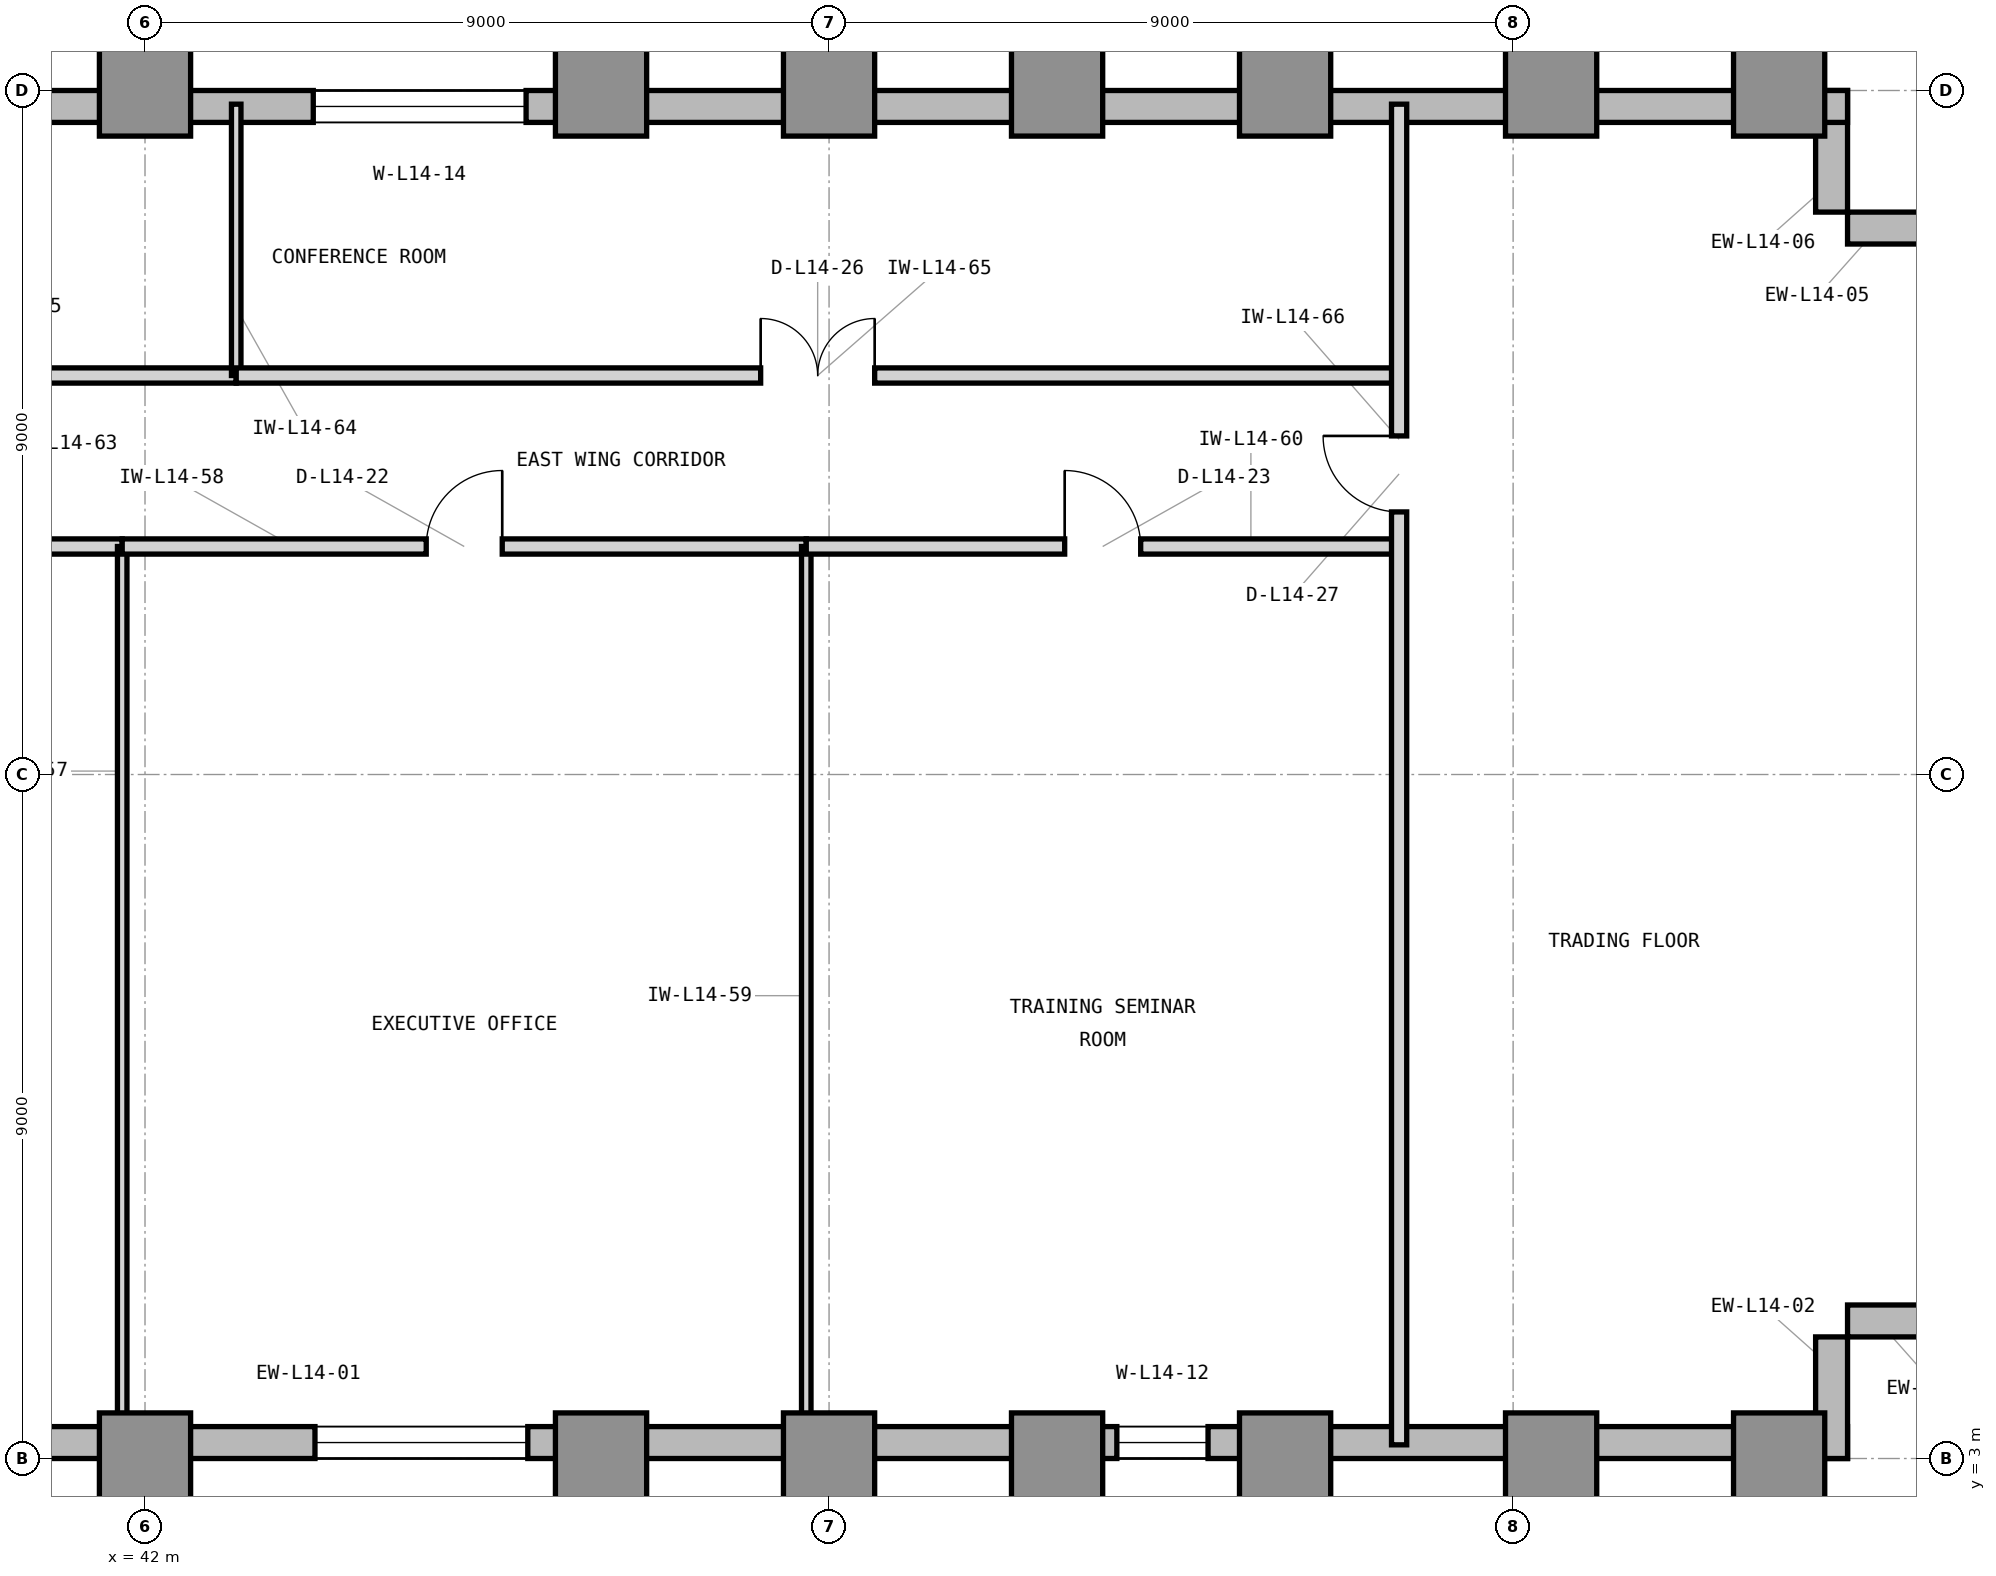
"""IFC4 building model, lengths in metres.
Left out: names, types, materials, properties, quantities, classifications, styles, units other than length and angle.
Written with IfcOpenShell. Run it as: python <this file> out.ifc"""

import sys

from ifc_helpers import new_model, si_unit, direction, frame, frame_2d, origin, origin_2d, place, context, subcontext, project, spatial, rectangle, extrude, element, fill, save


model = new_model("IFC4")
c1 = context("Model", 3, precision=1e-05, world=origin(), true_north=direction((0.0, 1.0)))
c2 = subcontext(c1, "Body", "Model", "MODEL_VIEW")
j1 = project(units=[si_unit("LENGTHUNIT", "METRE"), si_unit("PLANEANGLEUNIT", "RADIAN")], contexts=[c1])
p1 = place(None, origin())
s1 = spatial("IfcSite", under=j1, at=p1, CompositionType="ELEMENT")
p2 = place(p1, origin())
s2 = spatial("IfcBuilding", under=s1, at=p2, CompositionType="ELEMENT")
p3 = place(p2, frame((0.0, 0.0, 63.6)))
s3 = spatial("IfcBuildingStorey", under=s2, at=p3, CompositionType="ELEMENT", Elevation=63.6)
for number, where, z_axis, x_axis in (
    (1, (42.0, 3.0, 0.0), (0.0, 0.0, 1.0), (1.0, 0.0, 0.0)),
    (2, (42.0, 21.0, 0.0), (0.0, 0.0, 1.0), (1.0, 0.0, 0.0)),
    (3, (48.0, 3.0, 0.0), (0.0, 0.0, 1.0), (1.0, 0.0, 0.0)),
    (4, (48.0, 21.0, 0.0), (0.0, 0.0, 1.0), (1.0, 0.0, 0.0)),
    (5, (51.0, 3.0, 0.0), (0.0, 0.0, 1.0), (1.0, 0.0, 0.0)),
    (6, (51.0, 21.0, 0.0), (0.0, 0.0, 1.0), (1.0, 0.0, 0.0)),
    (7, (54.0, 3.0, 0.0), (0.0, 0.0, 1.0), (1.0, 0.0, 0.0)),
    (8, (54.0, 21.0, 0.0), (0.0, 0.0, 1.0), (1.0, 0.0, 0.0)),
    (9, (57.0, 3.0, 0.0), (0.0, 0.0, 1.0), (1.0, 0.0, 0.0)),
    (10, (57.0, 21.0, 0.0), (0.0, 0.0, 1.0), (1.0, 0.0, 0.0)),
    (11, (60.5, 3.0, 0.0), (0.0, 0.0, 1.0), (1.0, 0.0, 0.0)),
    (12, (60.5, 21.0, 0.0), (0.0, 0.0, 1.0), (1.0, 0.0, 0.0)),
    (13, (63.5, 3.0, 0.0), (0.0, 0.0, 1.0), (1.0, 0.0, 0.0)),
    (14, (63.5, 21.0, 0.0), (0.0, 0.0, 1.0), (1.0, 0.0, 0.0)),
):
    element("IfcColumn", number, at=place(p3, frame(where, z_axis=z_axis, x_axis=x_axis)), inside=s3, PredefinedType="COLUMN", context=c2, shape_type="SweptSolid", body=[
        extrude(rectangle(XDim=1.2, YDim=1.2, at=origin_2d()), origin(), (0.0, 0.0, 1.0), 4.2),
    ])
p4 = place(p3, frame((23.9, 3.21, 0.0), z_axis=(0.0, 0.0, 1.0), x_axis=(1.0, 0.0, 0.0)))
e15 = element("IfcWall", 15, at=p4, inside=s3, PredefinedType="STANDARD", context=c2, shape_type="SweptSolid", body=[
    extrude(rectangle(XDim=40.5, YDim=0.42, at=frame_2d((20.25, 0.0))), origin(), (0.0, 0.0, 1.0), 3.98),
])
p5 = place(p4, frame((1.1, 0.0, 0.85)))
e16 = element("IfcOpeningElement", 16, at=p5, cuts=e15, PredefinedType="OPENING", context=c2, shape_type="SweptSolid", body=[
    extrude(rectangle(XDim=1.2, YDim=2.45, at=frame_2d((0.6, 1.225))), frame((0.0, 0.22, 0.0), z_axis=(0.0, -1.0, 0.0), x_axis=(1.0, 0.0, 0.0)), (0.0, 0.0, 1.0), 0.44),
])
p6 = place(p4, frame((5.136, 0.0, 0.85)))
e17 = element("IfcOpeningElement", 17, at=p6, cuts=e15, PredefinedType="OPENING", context=c2, shape_type="SweptSolid", body=[
    extrude(rectangle(XDim=2.8, YDim=2.45, at=frame_2d((1.4, 1.225))), frame((0.0, 0.22, 0.0), z_axis=(0.0, -1.0, 0.0), x_axis=(1.0, 0.0, 0.0)), (0.0, 0.0, 1.0), 0.44),
])
p7 = place(p4, frame((12.636, 0.0, 0.85)))
e18 = element("IfcOpeningElement", 18, at=p7, cuts=e15, PredefinedType="OPENING", context=c2, shape_type="SweptSolid", body=[
    extrude(rectangle(XDim=2.8, YDim=2.45, at=frame_2d((1.4, 1.225))), frame((0.0, 0.22, 0.0), z_axis=(0.0, -1.0, 0.0), x_axis=(1.0, 0.0, 0.0)), (0.0, 0.0, 1.0), 0.44),
])
p8 = place(p4, frame((20.336, 0.0, 0.85)))
e19 = element("IfcOpeningElement", 19, at=p8, cuts=e15, PredefinedType="OPENING", context=c2, shape_type="SweptSolid", body=[
    extrude(rectangle(XDim=2.8, YDim=2.45, at=frame_2d((1.4, 1.225))), frame((0.0, 0.22, 0.0), z_axis=(0.0, -1.0, 0.0), x_axis=(1.0, 0.0, 0.0)), (0.0, 0.0, 1.0), 0.44),
])
p9 = place(p4, frame((30.886, 0.0, 0.85)))
e20 = element("IfcOpeningElement", 20, at=p9, cuts=e15, PredefinedType="OPENING", context=c2, shape_type="SweptSolid", body=[
    extrude(rectangle(XDim=1.2, YDim=2.45, at=frame_2d((0.6, 1.225))), frame((0.0, 0.22, 0.0), z_axis=(0.0, -1.0, 0.0), x_axis=(1.0, 0.0, 0.0)), (0.0, 0.0, 1.0), 0.44),
])
for number, where, z_axis, x_axis in (
    (21, (64.19, 3.0, 0.0), (0.0, 0.0, 1.0), (0.0, 1.0, 0.0)),
    (22, (64.4, 4.81, 0.0), (0.0, 0.0, 1.0), (1.0, 0.0, 0.0)),
    (23, (66.0, 19.19, 0.0), (0.0, 0.0, 1.0), (-1.0, 0.0, 0.0)),
    (24, (64.19, 19.4, 0.0), (0.0, 0.0, 1.0), (0.0, 1.0, 0.0)),
):
    element("IfcWall", number, at=place(p3, frame(where, z_axis=z_axis, x_axis=x_axis)), inside=s3, PredefinedType="STANDARD", context=c2, shape_type="SweptSolid", body=[
        extrude(rectangle(XDim=1.6, YDim=0.42, at=frame_2d((0.8, 0.0))), origin(), (0.0, 0.0, 1.0), 3.98),
    ])
p10 = place(p3, frame((64.4, 20.79, 0.0), z_axis=(0.0, 0.0, 1.0), x_axis=(-1.0, 0.0, 0.0)))
e25 = element("IfcWall", 25, at=p10, inside=s3, PredefinedType="STANDARD", context=c2, shape_type="SweptSolid", body=[
    extrude(rectangle(XDim=40.4, YDim=0.42, at=frame_2d((20.2, 0.0))), origin(), (0.0, 0.0, 1.0), 3.98),
])
p11 = place(p10, frame((26.375, 0.0, 0.85)))
e26 = element("IfcOpeningElement", 26, at=p11, cuts=e25, PredefinedType="OPENING", context=c2, shape_type="SweptSolid", body=[
    extrude(rectangle(XDim=2.8, YDim=2.45, at=frame_2d((1.4, 1.225))), frame((0.0, 0.22, 0.0), z_axis=(0.0, -1.0, 0.0), x_axis=(1.0, 0.0, 0.0)), (0.0, 0.0, 1.0), 0.44),
])
p12 = place(p10, frame((38.222, 0.0, 0.85)))
e27 = element("IfcOpeningElement", 27, at=p12, cuts=e25, PredefinedType="OPENING", context=c2, shape_type="SweptSolid", body=[
    extrude(rectangle(XDim=1.2, YDim=2.45, at=frame_2d((0.6, 1.225))), frame((0.0, 0.22, 0.0), z_axis=(0.0, -1.0, 0.0), x_axis=(1.0, 0.0, 0.0)), (0.0, 0.0, 1.0), 0.44),
])
p13 = place(p10, frame((32.536, 0.0, 0.85)))
e28 = element("IfcOpeningElement", 28, at=p13, cuts=e25, PredefinedType="OPENING", context=c2, shape_type="SweptSolid", body=[
    extrude(rectangle(XDim=2.8, YDim=2.45, at=frame_2d((1.4, 1.225))), frame((0.0, 0.22, 0.0), z_axis=(0.0, -1.0, 0.0), x_axis=(1.0, 0.0, 0.0)), (0.0, 0.0, 1.0), 0.44),
])
p14 = place(p10, frame((17.386, 0.0, 0.85)))
e29 = element("IfcOpeningElement", 29, at=p14, cuts=e25, PredefinedType="OPENING", context=c2, shape_type="SweptSolid", body=[
    extrude(rectangle(XDim=2.8, YDim=2.45, at=frame_2d((1.4, 1.225))), frame((0.0, 0.22, 0.0), z_axis=(0.0, -1.0, 0.0), x_axis=(1.0, 0.0, 0.0)), (0.0, 0.0, 1.0), 0.44),
])
p15 = place(p3, frame((34.2, 15.0, 0.0), z_axis=(0.0, 0.0, 1.0), x_axis=(1.0, 0.0, 0.0)))
e30 = element("IfcWall", 30, at=p15, inside=s3, PredefinedType="PARTITIONING", context=c2, shape_type="SweptSolid", body=[
    extrude(rectangle(XDim=7.5, YDim=0.2, at=frame_2d((3.75, 0.0))), origin(), (0.0, 0.0, 1.0), 3.426),
])
p16 = place(p15, frame((3.25, 0.0, 0.0)))
e31 = element("IfcOpeningElement", 31, at=p16, cuts=e30, PredefinedType="OPENING", context=c2, shape_type="SweptSolid", body=[
    extrude(rectangle(XDim=1.0, YDim=2.15, at=frame_2d((0.5, 1.075))), frame((0.0, 0.11, 0.0), z_axis=(0.0, -1.0, 0.0), x_axis=(1.0, 0.0, 0.0)), (0.0, 0.0, 1.0), 0.22),
])
p17 = place(p3, frame((41.7, 3.18, 0.0), z_axis=(0.0, 0.0, 1.0), x_axis=(0.0, 1.0, 0.0)))
e32 = element("IfcWall", 32, at=p17, inside=s3, PredefinedType="PARTITIONING", context=c2, shape_type="SweptSolid", body=[
    extrude(rectangle(XDim=11.82, YDim=0.125, at=frame_2d((5.91, 0.0))), origin(), (0.0, 0.0, 1.0), 3.97),
])
p18 = place(p3, frame((41.7, 15.0, 0.0), z_axis=(0.0, 0.0, 1.0), x_axis=(1.0, 0.0, 0.0)))
e33 = element("IfcWall", 33, at=p18, inside=s3, PredefinedType="PARTITIONING", context=c2, shape_type="SweptSolid", body=[
    extrude(rectangle(XDim=9.0, YDim=0.2, at=frame_2d((4.5, 0.0))), origin(), (0.0, 0.0, 1.0), 3.426),
])
p19 = place(p18, frame((4.0, 0.0, 0.0)))
e34 = element("IfcOpeningElement", 34, at=p19, cuts=e33, PredefinedType="OPENING", context=c2, shape_type="SweptSolid", body=[
    extrude(rectangle(XDim=1.0, YDim=2.15, at=frame_2d((0.5, 1.075))), frame((0.0, 0.11, 0.0), z_axis=(0.0, -1.0, 0.0), x_axis=(1.0, 0.0, 0.0)), (0.0, 0.0, 1.0), 0.22),
])
p20 = place(p3, frame((50.7, 3.18, 0.0), z_axis=(0.0, 0.0, 1.0), x_axis=(0.0, 1.0, 0.0)))
e35 = element("IfcWall", 35, at=p20, inside=s3, PredefinedType="PARTITIONING", context=c2, shape_type="SweptSolid", body=[
    extrude(rectangle(XDim=11.82, YDim=0.125, at=frame_2d((5.91, 0.0))), origin(), (0.0, 0.0, 1.0), 3.97),
])
p21 = place(p3, frame((50.7, 15.0, 0.0), z_axis=(0.0, 0.0, 1.0), x_axis=(1.0, 0.0, 0.0)))
e36 = element("IfcWall", 36, at=p21, inside=s3, PredefinedType="PARTITIONING", context=c2, shape_type="SweptSolid", body=[
    extrude(rectangle(XDim=7.8, YDim=0.2, at=frame_2d((3.9, 0.0))), origin(), (0.0, 0.0, 1.0), 3.426),
])
p22 = place(p21, frame((3.4, 0.0, 0.0)))
e37 = element("IfcOpeningElement", 37, at=p22, cuts=e36, PredefinedType="OPENING", context=c2, shape_type="SweptSolid", body=[
    extrude(rectangle(XDim=1.0, YDim=2.15, at=frame_2d((0.5, 1.075))), frame((0.0, 0.11, 0.0), z_axis=(0.0, -1.0, 0.0), x_axis=(1.0, 0.0, 0.0)), (0.0, 0.0, 1.0), 0.22),
])
p23 = place(p3, frame((34.2, 17.25, 0.0), z_axis=(0.0, 0.0, 1.0), x_axis=(1.0, 0.0, 0.0)))
e38 = element("IfcWall", 38, at=p23, inside=s3, PredefinedType="PARTITIONING", context=c2, shape_type="SweptSolid", body=[
    extrude(rectangle(XDim=9.0, YDim=0.2, at=frame_2d((4.5, 0.0))), origin(), (0.0, 0.0, 1.0), 3.97),
])
p24 = place(p23, frame((4.0, 0.0, 0.0)))
e39 = element("IfcOpeningElement", 39, at=p24, cuts=e38, PredefinedType="OPENING", context=c2, shape_type="SweptSolid", body=[
    extrude(rectangle(XDim=1.0, YDim=2.15, at=frame_2d((0.5, 1.075))), frame((0.0, 0.11, 0.0), z_axis=(0.0, -1.0, 0.0), x_axis=(1.0, 0.0, 0.0)), (0.0, 0.0, 1.0), 0.22),
])
p25 = place(p3, frame((43.2, 17.25, 0.0), z_axis=(0.0, 0.0, 1.0), x_axis=(0.0, 1.0, 0.0)))
e40 = element("IfcWall", 40, at=p25, inside=s3, PredefinedType="PARTITIONING", context=c2, shape_type="SweptSolid", body=[
    extrude(rectangle(XDim=3.57, YDim=0.125, at=frame_2d((1.785, 0.0))), origin(), (0.0, 0.0, 1.0), 3.97),
])
p26 = place(p3, frame((43.2, 17.25, 0.0), z_axis=(0.0, 0.0, 1.0), x_axis=(1.0, 0.0, 0.0)))
e41 = element("IfcWall", 41, at=p26, inside=s3, PredefinedType="PARTITIONING", context=c2, shape_type="SweptSolid", body=[
    extrude(rectangle(XDim=15.3, YDim=0.2, at=frame_2d((7.65, 0.0))), origin(), (0.0, 0.0, 1.0), 3.97),
])
p27 = place(p26, frame((6.9, 0.0, 0.0)))
e42 = element("IfcOpeningElement", 42, at=p27, cuts=e41, PredefinedType="OPENING", context=c2, shape_type="SweptSolid", body=[
    extrude(rectangle(XDim=1.5, YDim=2.3, at=frame_2d((0.75, 1.15))), frame((0.0, 0.11, 0.0), z_axis=(0.0, -1.0, 0.0), x_axis=(1.0, 0.0, 0.0)), (0.0, 0.0, 1.0), 0.22),
])
p28 = place(p3, frame((58.5, 3.18, 0.0), z_axis=(0.0, 0.0, 1.0), x_axis=(0.0, 1.0, 0.0)))
e43 = element("IfcWall", 43, at=p28, inside=s3, PredefinedType="PARTITIONING", context=c2, shape_type="SweptSolid", body=[
    extrude(rectangle(XDim=17.64, YDim=0.2, at=frame_2d((8.82, 0.0))), origin(), (0.0, 0.0, 1.0), 3.97),
])
p29 = place(p28, frame((12.275, 0.0, 0.0)))
e44 = element("IfcOpeningElement", 44, at=p29, cuts=e43, PredefinedType="OPENING", context=c2, shape_type="SweptSolid", body=[
    extrude(rectangle(XDim=1.0, YDim=2.15, at=frame_2d((0.5, 1.075))), frame((0.0, 0.11, 0.0), z_axis=(0.0, -1.0, 0.0), x_axis=(1.0, 0.0, 0.0)), (0.0, 0.0, 1.0), 0.22),
])
p30 = place(p19, origin())
e45 = element("IfcDoor", 45, at=p30, inside=s3, OperationType="SINGLE_SWING_RIGHT", PredefinedType="DOOR", context=c2, shape_type="SweptSolid", body=[
    extrude(rectangle(XDim=1.0, YDim=2.15, at=frame_2d((0.5, 1.075))), frame((0.0, 0.025, 0.0), z_axis=(0.0, -1.0, 0.0), x_axis=(1.0, 0.0, 0.0)), (0.0, 0.0, 1.0), 0.05),
])
fill(e34, e45)
p31 = place(p22, origin())
e46 = element("IfcDoor", 46, at=p31, inside=s3, OperationType="SINGLE_SWING_LEFT", PredefinedType="DOOR", context=c2, shape_type="SweptSolid", body=[
    extrude(rectangle(XDim=1.0, YDim=2.15, at=frame_2d((0.5, 1.075))), frame((0.0, 0.025, 0.0), z_axis=(0.0, -1.0, 0.0), x_axis=(1.0, 0.0, 0.0)), (0.0, 0.0, 1.0), 0.05),
])
fill(e37, e46)
p32 = place(p27, origin())
e47 = element("IfcDoor", 47, at=p32, inside=s3, OperationType="DOUBLE_DOOR_SINGLE_SWING", PredefinedType="DOOR", context=c2, shape_type="SweptSolid", body=[
    extrude(rectangle(XDim=1.5, YDim=2.3, at=frame_2d((0.75, 1.15))), frame((0.0, 0.025, 0.0), z_axis=(0.0, -1.0, 0.0), x_axis=(1.0, 0.0, 0.0)), (0.0, 0.0, 1.0), 0.05),
])
fill(e42, e47)
p33 = place(p29, origin())
e48 = element("IfcDoor", 48, at=p33, inside=s3, OperationType="SINGLE_SWING_RIGHT", PredefinedType="DOOR", context=c2, shape_type="SweptSolid", body=[
    extrude(rectangle(XDim=1.0, YDim=2.15, at=frame_2d((0.5, 1.075))), frame((0.0, 0.025, 0.0), z_axis=(0.0, -1.0, 0.0), x_axis=(1.0, 0.0, 0.0)), (0.0, 0.0, 1.0), 0.05),
])
fill(e44, e48)
p34 = place(p8, origin())
e49 = element("IfcWindow", 49, at=p34, inside=s3, PartitioningType="SINGLE_PANEL", PredefinedType="WINDOW", context=c2, shape_type="SweptSolid", body=[
    extrude(rectangle(XDim=2.8, YDim=2.45, at=frame_2d((1.4, 1.225))), frame((0.0, 0.11, 0.0), z_axis=(0.0, -1.0, 0.0), x_axis=(1.0, 0.0, 0.0)), (0.0, 0.0, 1.0), 0.06),
])
fill(e19, e49)
p35 = place(p9, origin())
e50 = element("IfcWindow", 50, at=p35, inside=s3, PartitioningType="SINGLE_PANEL", PredefinedType="WINDOW", context=c2, shape_type="SweptSolid", body=[
    extrude(rectangle(XDim=1.2, YDim=2.45, at=frame_2d((0.6, 1.225))), frame((0.0, 0.11, 0.0), z_axis=(0.0, -1.0, 0.0), x_axis=(1.0, 0.0, 0.0)), (0.0, 0.0, 1.0), 0.06),
])
fill(e20, e50)
p36 = place(p14, origin())
e51 = element("IfcWindow", 51, at=p36, inside=s3, PartitioningType="SINGLE_PANEL", PredefinedType="WINDOW", context=c2, shape_type="SweptSolid", body=[
    extrude(rectangle(XDim=2.8, YDim=2.45, at=frame_2d((1.4, 1.225))), frame((0.0, 0.11, 0.0), z_axis=(0.0, -1.0, 0.0), x_axis=(1.0, 0.0, 0.0)), (0.0, 0.0, 1.0), 0.06),
])
fill(e29, e51)
save(model, sys.argv[1])
